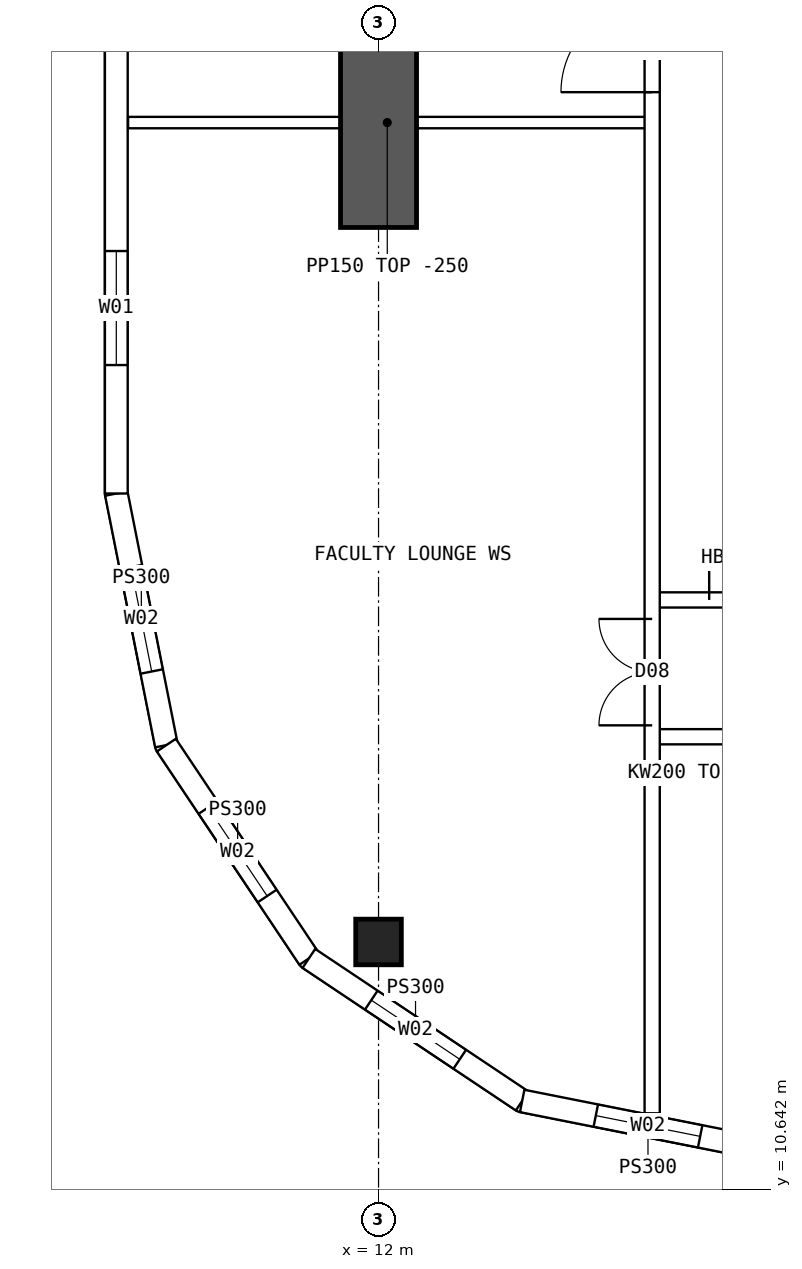
"""IFC4 building model, lengths in metres.
Left out: names, types, materials, properties, quantities, classifications, styles, units other than length and angle.
Written with IfcOpenShell. Run it as: python <this file> out.ifc"""

import sys

from ifc_helpers import new_model, si_unit, direction, frame, frame_2d, origin, origin_2d, place, context, subcontext, project, spatial, polyline, rectangle, hollow_rectangle, outline, extrude, element, fill, save


model = new_model("IFC4")
c1 = context("Model", 3, precision=1e-05, world=origin(), true_north=direction((0.0, 1.0)))
c2 = subcontext(c1, "Body", "Model", "MODEL_VIEW")
j1 = project(units=[si_unit("LENGTHUNIT", "METRE"), si_unit("PLANEANGLEUNIT", "RADIAN")], contexts=[c1])
p1 = place(None, origin())
s1 = spatial("IfcSite", under=j1, at=p1, CompositionType="ELEMENT")
p2 = place(p1, origin())
s2 = spatial("IfcBuilding", under=s1, at=p2, CompositionType="ELEMENT")
p3 = place(p2, frame((0.0, 0.0, 231.55)))
s3 = spatial("IfcBuildingStorey", under=s2, at=p3, CompositionType="ELEMENT", Elevation=231.55)
p4 = place(p3, frame((12.0, 13.9, 0.0), z_axis=(0.0, 0.0, 1.0), x_axis=(1.0, 0.0, 0.0)))
e1 = element("IfcColumn", 1, at=p4, inside=s3, PredefinedType="COLUMN", context=c2, shape_type="SweptSolid", body=[
    extrude(hollow_rectangle(XDim=0.6, YDim=0.6, WallThickness=0.06, at=origin_2d()), origin(), (0.0, 0.0, 1.0), 3.75),
])
p5 = place(p3, frame((12.0, 23.3, 0.0), z_axis=(0.0, 0.0, 1.0), x_axis=(0.0, 1.0, 0.0)))
e2 = element("IfcWall", 2, at=p5, inside=s3, PredefinedType="SHEAR", context=c2, shape_type="SweptSolid", body=[
    extrude(rectangle(XDim=5.0, YDim=1.0, at=frame_2d((2.5, 0.0))), origin(), (0.0, 0.0, 1.0), 3.75),
])
p6 = place(p3, frame((8.55, 44.2, 0.0), z_axis=(0.0, 0.0, 1.0), x_axis=(0.0, -1.0, 0.0)))
e3 = element("IfcWall", 3, at=p6, inside=s3, PredefinedType="SOLIDWALL", context=c2, shape_type="SweptSolid", body=[
    extrude(outline(polyline([(-0.015, -0.15), (24.415, -0.15), (24.385, 0.15), (0.015, 0.15), (-0.015, -0.15)])), origin(), (0.0, 0.0, 1.0), 3.5),
])
p7 = place(p6, frame((1.69, 0.0, 0.9)))
e4 = element("IfcOpeningElement", 4, at=p7, cuts=e3, PredefinedType="OPENING", context=c2, shape_type="SweptSolid", body=[
    extrude(rectangle(XDim=1.5, YDim=2.0, at=frame_2d((0.75, 1.0))), frame((0.0, 0.16, 0.0), z_axis=(0.0, -1.0, 0.0), x_axis=(1.0, 0.0, 0.0)), (0.0, 0.0, 1.0), 0.32),
])
p8 = place(p6, frame((6.57, 0.0, 0.9)))
e5 = element("IfcOpeningElement", 5, at=p8, cuts=e3, PredefinedType="OPENING", context=c2, shape_type="SweptSolid", body=[
    extrude(rectangle(XDim=1.5, YDim=2.0, at=frame_2d((0.75, 1.0))), frame((0.0, 0.16, 0.0), z_axis=(0.0, -1.0, 0.0), x_axis=(1.0, 0.0, 0.0)), (0.0, 0.0, 1.0), 0.32),
])
p9 = place(p6, frame((11.45, 0.0, 0.9)))
e6 = element("IfcOpeningElement", 6, at=p9, cuts=e3, PredefinedType="OPENING", context=c2, shape_type="SweptSolid", body=[
    extrude(rectangle(XDim=1.5, YDim=2.0, at=frame_2d((0.75, 1.0))), frame((0.0, 0.16, 0.0), z_axis=(0.0, -1.0, 0.0), x_axis=(1.0, 0.0, 0.0)), (0.0, 0.0, 1.0), 0.32),
])
p10 = place(p6, frame((16.33, 0.0, 0.9)))
e7 = element("IfcOpeningElement", 7, at=p10, cuts=e3, PredefinedType="OPENING", context=c2, shape_type="SweptSolid", body=[
    extrude(rectangle(XDim=1.5, YDim=2.0, at=frame_2d((0.75, 1.0))), frame((0.0, 0.16, 0.0), z_axis=(0.0, -1.0, 0.0), x_axis=(1.0, 0.0, 0.0)), (0.0, 0.0, 1.0), 0.32),
])
p11 = place(p6, frame((21.21, 0.0, 0.9)))
e8 = element("IfcOpeningElement", 8, at=p11, cuts=e3, PredefinedType="OPENING", context=c2, shape_type="SweptSolid", body=[
    extrude(rectangle(XDim=1.5, YDim=2.0, at=frame_2d((0.75, 1.0))), frame((0.0, 0.16, 0.0), z_axis=(0.0, -1.0, 0.0), x_axis=(1.0, 0.0, 0.0)), (0.0, 0.0, 1.0), 0.32),
])
p12 = place(p3, frame((8.55, 19.8, 0.0), z_axis=(0.0, 0.0, 1.0), x_axis=(0.19508664885, -0.980786011034, 0.0)))
e9 = element("IfcWall", 9, at=p12, inside=s3, PredefinedType="SOLIDWALL", context=c2, shape_type="SweptSolid", body=[
    extrude(outline(polyline([(-0.015, -0.15), (3.405, -0.15), (3.345, 0.15), (0.015, 0.15), (-0.015, -0.15)])), origin(), (0.0, 0.0, 1.0), 3.5),
])
p13 = place(p12, frame((0.988, 0.0, 0.9)))
e10 = element("IfcOpeningElement", 10, at=p13, cuts=e9, PredefinedType="OPENING", context=c2, shape_type="SweptSolid", body=[
    extrude(rectangle(XDim=1.4, YDim=1.8, at=frame_2d((0.7, 0.9))), frame((0.0, 0.16, 0.0), z_axis=(0.0, -1.0, 0.0), x_axis=(1.0, 0.0, 0.0)), (0.0, 0.0, 1.0), 0.32),
])
p14 = place(p3, frame((9.208, 16.49, 0.0), z_axis=(0.0, 0.0, 1.0), x_axis=(0.555567969291, -0.831471124873, 0.0)))
e11 = element("IfcWall", 11, at=p14, inside=s3, PredefinedType="SOLIDWALL", context=c2, shape_type="SweptSolid", body=[
    extrude(outline(polyline([(-0.03, -0.15), (3.405, -0.15), (3.345, 0.15), (0.03, 0.15), (-0.03, -0.15)])), origin(), (0.0, 0.0, 1.0), 3.5),
])
p15 = place(p14, frame((0.988, 0.0, 0.9)))
e12 = element("IfcOpeningElement", 12, at=p15, cuts=e11, PredefinedType="OPENING", context=c2, shape_type="SweptSolid", body=[
    extrude(rectangle(XDim=1.4, YDim=1.8, at=frame_2d((0.7, 0.9))), frame((0.0, 0.16, 0.0), z_axis=(0.0, -1.0, 0.0), x_axis=(1.0, 0.0, 0.0)), (0.0, 0.0, 1.0), 0.32),
])
p16 = place(p3, frame((11.083, 13.684, 0.0), z_axis=(0.0, 0.0, 1.0), x_axis=(0.831460037396, -0.555584562613, 0.0)))
e13 = element("IfcWall", 13, at=p16, inside=s3, PredefinedType="SOLIDWALL", context=c2, shape_type="SweptSolid", body=[
    extrude(outline(polyline([(-0.03, -0.15), (3.405, -0.15), (3.345, 0.15), (0.03, 0.15), (-0.03, -0.15)])), origin(), (0.0, 0.0, 1.0), 3.5),
])
p17 = place(p16, frame((0.988, 0.0, 0.9)))
e14 = element("IfcOpeningElement", 14, at=p17, cuts=e13, PredefinedType="OPENING", context=c2, shape_type="SweptSolid", body=[
    extrude(rectangle(XDim=1.4, YDim=1.8, at=frame_2d((0.7, 0.9))), frame((0.0, 0.16, 0.0), z_axis=(0.0, -1.0, 0.0), x_axis=(1.0, 0.0, 0.0)), (0.0, 0.0, 1.0), 0.32),
])
p18 = place(p3, frame((13.89, 11.808, 0.0), z_axis=(0.0, 0.0, 1.0), x_axis=(0.98078325777, -0.195100490205, 0.0)))
e15 = element("IfcWall", 15, at=p18, inside=s3, PredefinedType="SOLIDWALL", context=c2, shape_type="SweptSolid", body=[
    extrude(outline(polyline([(-0.03, -0.15), (3.405, -0.15), (3.345, 0.15), (0.03, 0.15), (-0.03, -0.15)])), origin(), (0.0, 0.0, 1.0), 3.5),
])
p19 = place(p18, frame((0.988, 0.0, 0.9)))
e16 = element("IfcOpeningElement", 16, at=p19, cuts=e15, PredefinedType="OPENING", context=c2, shape_type="SweptSolid", body=[
    extrude(rectangle(XDim=1.4, YDim=1.8, at=frame_2d((0.7, 0.9))), frame((0.0, 0.16, 0.0), z_axis=(0.0, -1.0, 0.0), x_axis=(1.0, 0.0, 0.0)), (0.0, 0.0, 1.0), 0.32),
])
p20 = place(p3, frame((15.6, 16.6, 0.0), z_axis=(0.0, 0.0, 1.0), x_axis=(1.0, 0.0, 0.0)))
e17 = element("IfcWall", 17, at=p20, inside=s3, PredefinedType="SOLIDWALL", context=c2, shape_type="SweptSolid", body=[
    extrude(rectangle(XDim=2.05, YDim=0.2, at=frame_2d((1.025, 0.0))), origin(), (0.0, 0.0, 1.0), 3.5),
])
p21 = place(p20, frame((0.95, 0.0, 0.0)))
e18 = element("IfcOpeningElement", 18, at=p21, cuts=e17, PredefinedType="OPENING", context=c2, shape_type="SweptSolid", body=[
    extrude(rectangle(XDim=0.9, YDim=2.1, at=frame_2d((0.45, 1.05))), frame((0.0, 0.11, 0.0), z_axis=(0.0, -1.0, 0.0), x_axis=(1.0, 0.0, 0.0)), (0.0, 0.0, 1.0), 0.22),
])
p22 = place(p3, frame((15.6, 18.4, 0.0), z_axis=(0.0, 0.0, 1.0), x_axis=(1.0, 0.0, 0.0)))
e19 = element("IfcWall", 19, at=p22, inside=s3, PredefinedType="SOLIDWALL", context=c2, shape_type="SweptSolid", body=[
    extrude(rectangle(XDim=2.05, YDim=0.2, at=frame_2d((1.025, 0.0))), origin(), (0.0, 0.0, 1.0), 3.5),
])
p23 = place(p22, frame((0.75, 0.0, 0.0)))
e20 = element("IfcOpeningElement", 20, at=p23, cuts=e19, PredefinedType="OPENING", context=c2, shape_type="SweptSolid", body=[
    extrude(rectangle(XDim=1.2, YDim=2.1, at=frame_2d((0.6, 1.05))), frame((0.0, 0.11, 0.0), z_axis=(0.0, -1.0, 0.0), x_axis=(1.0, 0.0, 0.0)), (0.0, 0.0, 1.0), 0.22),
])
p24 = place(p3, frame((15.6, 11.646, 0.0), z_axis=(0.0, 0.0, 1.0), x_axis=(0.0, 1.0, 0.0)))
e21 = element("IfcWall", 21, at=p24, inside=s3, PredefinedType="SOLIDWALL", context=c2, shape_type="SweptSolid", body=[
    extrude(rectangle(XDim=40.708, YDim=0.2, at=frame_2d((20.354, 0.0))), origin(), (0.0, 0.0, 1.0), 3.5),
])
p25 = place(p24, frame((13.434, 0.0, 0.0)))
e22 = element("IfcOpeningElement", 22, at=p25, cuts=e21, PredefinedType="OPENING", context=c2, shape_type="SweptSolid", body=[
    extrude(rectangle(XDim=1.2, YDim=2.1, at=frame_2d((0.6, 1.05))), frame((0.0, 0.11, 0.0), z_axis=(0.0, -1.0, 0.0), x_axis=(1.0, 0.0, 0.0)), (0.0, 0.0, 1.0), 0.22),
])
p26 = place(p24, frame((5.104, 0.0, 0.0)))
e23 = element("IfcOpeningElement", 23, at=p26, cuts=e21, PredefinedType="OPENING", context=c2, shape_type="SweptSolid", body=[
    extrude(rectangle(XDim=1.4, YDim=2.1, at=frame_2d((0.7, 1.05))), frame((0.0, 0.11, 0.0), z_axis=(0.0, -1.0, 0.0), x_axis=(1.0, 0.0, 0.0)), (0.0, 0.0, 1.0), 0.22),
])
p27 = place(p24, frame((34.104, 0.0, 0.0)))
e24 = element("IfcOpeningElement", 24, at=p27, cuts=e21, PredefinedType="OPENING", context=c2, shape_type="SweptSolid", body=[
    extrude(rectangle(XDim=1.4, YDim=2.1, at=frame_2d((0.7, 1.05))), frame((0.0, 0.11, 0.0), z_axis=(0.0, -1.0, 0.0), x_axis=(1.0, 0.0, 0.0)), (0.0, 0.0, 1.0), 0.22),
])
p28 = place(p3, frame((8.705, 24.68, 0.0), z_axis=(0.0, 0.0, 1.0), x_axis=(1.0, 0.0, 0.0)))
e25 = element("IfcWall", 25, at=p28, inside=s3, PredefinedType="PARTITIONING", context=c2, shape_type="SweptSolid", body=[
    extrude(rectangle(XDim=6.82, YDim=0.15, at=frame_2d((3.41, 0.0))), origin(), (0.0, 0.0, 1.0), 3.5),
])
p29 = place(p11, origin())
e26 = element("IfcWindow", 26, at=p29, inside=s3, PartitioningType="SINGLE_PANEL", PredefinedType="WINDOW", context=c2, shape_type="SweptSolid", body=[
    extrude(rectangle(XDim=1.5, YDim=2.0, at=frame_2d((0.75, 1.0))), frame((0.0, 0.03, 0.0), z_axis=(0.0, -1.0, 0.0), x_axis=(1.0, 0.0, 0.0)), (0.0, 0.0, 1.0), 0.06),
])
fill(e8, e26)
p30 = place(p13, origin())
e27 = element("IfcWindow", 27, at=p30, inside=s3, PartitioningType="SINGLE_PANEL", PredefinedType="WINDOW", context=c2, shape_type="SweptSolid", body=[
    extrude(rectangle(XDim=1.4, YDim=1.8, at=frame_2d((0.7, 0.9))), frame((0.0, 0.03, 0.0), z_axis=(0.0, -1.0, 0.0), x_axis=(1.0, 0.0, 0.0)), (0.0, 0.0, 1.0), 0.06),
])
fill(e10, e27)
p31 = place(p15, origin())
e28 = element("IfcWindow", 28, at=p31, inside=s3, PartitioningType="SINGLE_PANEL", PredefinedType="WINDOW", context=c2, shape_type="SweptSolid", body=[
    extrude(rectangle(XDim=1.4, YDim=1.8, at=frame_2d((0.7, 0.9))), frame((0.0, 0.03, 0.0), z_axis=(0.0, -1.0, 0.0), x_axis=(1.0, 0.0, 0.0)), (0.0, 0.0, 1.0), 0.06),
])
fill(e12, e28)
p32 = place(p17, origin())
e29 = element("IfcWindow", 29, at=p32, inside=s3, PartitioningType="SINGLE_PANEL", PredefinedType="WINDOW", context=c2, shape_type="SweptSolid", body=[
    extrude(rectangle(XDim=1.4, YDim=1.8, at=frame_2d((0.7, 0.9))), frame((0.0, 0.03, 0.0), z_axis=(0.0, -1.0, 0.0), x_axis=(1.0, 0.0, 0.0)), (0.0, 0.0, 1.0), 0.06),
])
fill(e14, e29)
p33 = place(p19, origin())
e30 = element("IfcWindow", 30, at=p33, inside=s3, PartitioningType="SINGLE_PANEL", PredefinedType="WINDOW", context=c2, shape_type="SweptSolid", body=[
    extrude(rectangle(XDim=1.4, YDim=1.8, at=frame_2d((0.7, 0.9))), frame((0.0, 0.03, 0.0), z_axis=(0.0, -1.0, 0.0), x_axis=(1.0, 0.0, 0.0)), (0.0, 0.0, 1.0), 0.06),
])
fill(e16, e30)
p34 = place(p23, origin())
e31 = element("IfcDoor", 31, at=p34, inside=s3, OperationType="DOUBLE_DOOR_SINGLE_SWING", PredefinedType="DOOR", context=c2, shape_type="SweptSolid", body=[
    extrude(rectangle(XDim=1.2, YDim=2.1, at=frame_2d((0.6, 1.05))), frame((0.0, 0.025, 0.0), z_axis=(0.0, -1.0, 0.0), x_axis=(1.0, 0.0, 0.0)), (0.0, 0.0, 1.0), 0.05),
])
fill(e20, e31)
p35 = place(p25, origin())
e32 = element("IfcDoor", 32, at=p35, inside=s3, OperationType="SINGLE_SWING_LEFT", PredefinedType="DOOR", context=c2, shape_type="SweptSolid", body=[
    extrude(rectangle(XDim=1.2, YDim=2.1, at=frame_2d((0.6, 1.05))), frame((0.0, 0.025, 0.0), z_axis=(0.0, -1.0, 0.0), x_axis=(1.0, 0.0, 0.0)), (0.0, 0.0, 1.0), 0.05),
])
fill(e22, e32)
p36 = place(p26, origin())
e33 = element("IfcDoor", 33, at=p36, inside=s3, OperationType="DOUBLE_DOOR_SINGLE_SWING", PredefinedType="DOOR", context=c2, shape_type="SweptSolid", body=[
    extrude(rectangle(XDim=1.4, YDim=2.1, at=frame_2d((0.7, 1.05))), frame((0.0, 0.025, 0.0), z_axis=(0.0, -1.0, 0.0), x_axis=(1.0, 0.0, 0.0)), (0.0, 0.0, 1.0), 0.05),
])
fill(e23, e33)
save(model, sys.argv[1])
